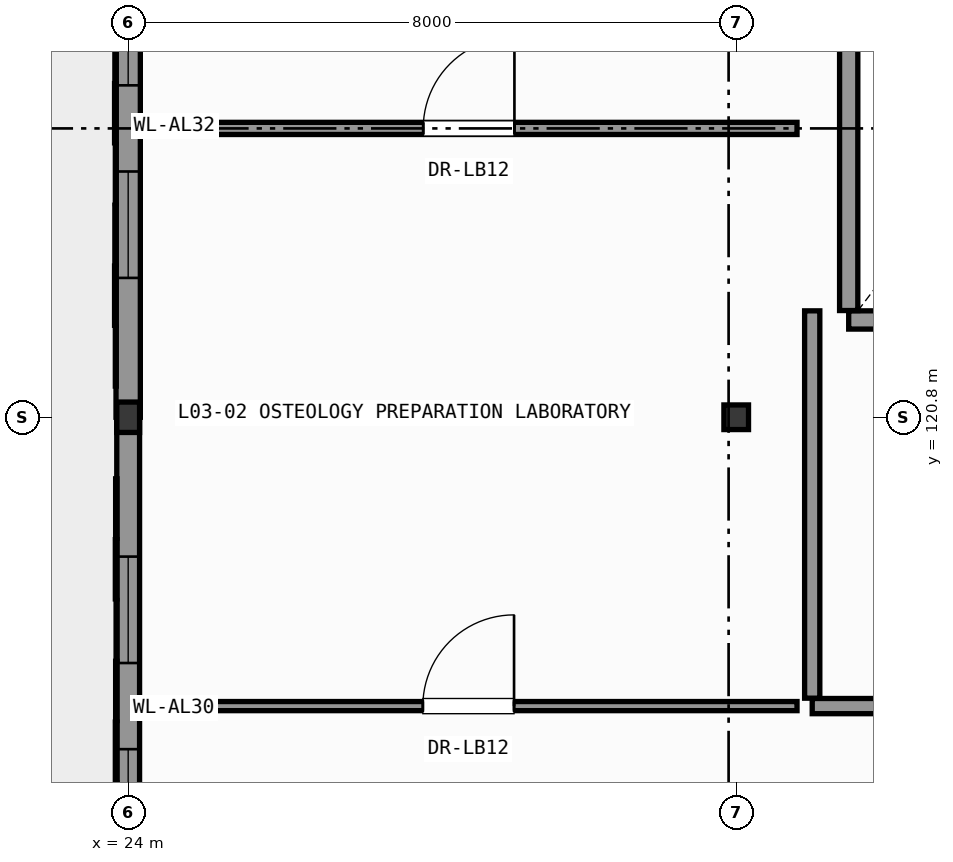
"""IFC4 building model, lengths in metres.
Left out: names, types, materials, properties, quantities, classifications, styles, units other than length and angle.
Written with IfcOpenShell. Run it as: python <this file> out.ifc"""

import sys

from ifc_helpers import new_model, si_unit, direction, frame, frame_2d, origin, origin_2d, place, context, subcontext, project, spatial, rectangle, hollow_circle, i_section, extrude, element, fill, save


model = new_model("IFC4")
c1 = context("Model", 3, precision=1e-05, world=origin(), true_north=direction((0.0, 1.0)))
c2 = subcontext(c1, "Body", "Model", "MODEL_VIEW")
j1 = project(units=[si_unit("LENGTHUNIT", "METRE"), si_unit("PLANEANGLEUNIT", "RADIAN")], contexts=[c1])
p1 = place(None, origin())
s1 = spatial("IfcSite", under=j1, at=p1, CompositionType="ELEMENT")
p2 = place(p1, origin())
s2 = spatial("IfcBuilding", under=s1, at=p2, CompositionType="ELEMENT")
p3 = place(p2, frame((0.0, 0.0, 13.2)))
s3 = spatial("IfcBuildingStorey", under=s2, at=p3, CompositionType="ELEMENT", Elevation=13.2)
p4 = place(p3, frame((24.0, 120.8, 0.0), z_axis=(0.0, 0.0, 1.0), x_axis=(1.0, 0.0, 0.0)))
e1 = element("IfcColumn", 1, at=p4, inside=s3, PredefinedType="COLUMN", context=c2, shape_type="SweptSolid", body=[
    extrude(i_section(OverallWidth=0.3, OverallDepth=0.4, WebThickness=0.013, FlangeThickness=0.024, FilletRadius=0.027, at=origin_2d()), origin(), (0.0, 0.0, 1.0), 4.8),
])
p5 = place(p3, frame((32.0, 120.8, 0.0), z_axis=(0.0, 0.0, 1.0), x_axis=(1.0, 0.0, 0.0)))
e2 = element("IfcColumn", 2, at=p5, inside=s3, PredefinedType="COLUMN", context=c2, shape_type="SweptSolid", body=[
    extrude(hollow_circle(Radius=0.162, WallThickness=0.016, at=origin_2d()), origin(), (0.0, 0.0, 1.0), 4.8),
])
p6 = place(p3, frame((24.0, 120.8, 0.0), z_axis=(0.0, 0.0, 1.0), x_axis=(0.0, 1.0, 0.0)))
e3 = element("IfcWall", 3, at=p6, inside=s3, PredefinedType="SOLIDWALL", context=c2, shape_type="SweptSolid", body=[
    extrude(rectangle(XDim=7.6, YDim=0.32, at=frame_2d((3.8, 0.0))), origin(), (0.0, 0.0, 1.0), 4.085),
])
p7 = place(p6, frame((1.833, 0.0, 0.95)))
e4 = element("IfcOpeningElement", 4, at=p7, cuts=e3, PredefinedType="OPENING", context=c2, shape_type="SweptSolid", body=[
    extrude(rectangle(XDim=1.4, YDim=2.0, at=frame_2d((0.7, 1.0))), frame((0.0, 0.17, 0.0), z_axis=(0.0, -1.0, 0.0), x_axis=(1.0, 0.0, 0.0)), (0.0, 0.0, 1.0), 0.34),
])
p8 = place(p6, frame((4.367, 0.0, 0.95)))
e5 = element("IfcOpeningElement", 5, at=p8, cuts=e3, PredefinedType="OPENING", context=c2, shape_type="SweptSolid", body=[
    extrude(rectangle(XDim=1.4, YDim=2.0, at=frame_2d((0.7, 1.0))), frame((0.0, 0.17, 0.0), z_axis=(0.0, -1.0, 0.0), x_axis=(1.0, 0.0, 0.0)), (0.0, 0.0, 1.0), 0.34),
])
p9 = place(p3, frame((24.0, 113.2, 0.0), z_axis=(0.0, 0.0, 1.0), x_axis=(0.0, 1.0, 0.0)))
e6 = element("IfcWall", 6, at=p9, inside=s3, PredefinedType="SOLIDWALL", context=c2, shape_type="SweptSolid", body=[
    extrude(rectangle(XDim=7.6, YDim=0.3, at=frame_2d((3.8, 0.0))), origin(), (0.0, 0.0, 1.0), 4.085),
])
p10 = place(p9, frame((1.833, 0.0, 0.95)))
e7 = element("IfcOpeningElement", 7, at=p10, cuts=e6, PredefinedType="OPENING", context=c2, shape_type="SweptSolid", body=[
    extrude(rectangle(XDim=1.4, YDim=2.0, at=frame_2d((0.7, 1.0))), frame((0.0, 0.16, 0.0), z_axis=(0.0, -1.0, 0.0), x_axis=(1.0, 0.0, 0.0)), (0.0, 0.0, 1.0), 0.32),
])
p11 = place(p9, frame((4.367, 0.0, 0.95)))
e8 = element("IfcOpeningElement", 8, at=p11, cuts=e6, PredefinedType="OPENING", context=c2, shape_type="SweptSolid", body=[
    extrude(rectangle(XDim=1.4, YDim=2.0, at=frame_2d((0.7, 1.0))), frame((0.0, 0.16, 0.0), z_axis=(0.0, -1.0, 0.0), x_axis=(1.0, 0.0, 0.0)), (0.0, 0.0, 1.0), 0.32),
])
p12 = place(p3, frame((33.48, 122.08, 0.0), z_axis=(0.0, 0.0, 1.0), x_axis=(1.0, 0.0, 0.0)))
e9 = element("IfcWall", 9, at=p12, inside=s3, PredefinedType="SHEAR", context=c2, shape_type="SweptSolid", body=[
    extrude(rectangle(XDim=4.04, YDim=0.24, at=frame_2d((2.02, 0.0))), origin(), (0.0, 0.0, 1.0), 4.56),
])
p13 = place(p12, frame((0.92, 0.0, 0.0)))
e10 = element("IfcOpeningElement", 10, at=p13, cuts=e9, PredefinedType="OPENING", context=c2, shape_type="SweptSolid", body=[
    extrude(rectangle(XDim=2.2, YDim=2.6, at=frame_2d((1.1, 1.3))), frame((0.0, 0.13, 0.0), z_axis=(0.0, -1.0, 0.0), x_axis=(1.0, 0.0, 0.0)), (0.0, 0.0, 1.0), 0.26),
])
p14 = place(p3, frame((33.48, 122.204, 0.0), z_axis=(0.0, 0.0, 1.0), x_axis=(0.0, 1.0, 0.0)))
e11 = element("IfcWall", 11, at=p14, inside=s3, PredefinedType="SHEAR", context=c2, shape_type="SweptSolid", body=[
    extrude(rectangle(XDim=4.992, YDim=0.24, at=frame_2d((2.496, 0.0))), origin(), (0.0, 0.0, 1.0), 4.56),
])
p15 = place(p3, frame((33.0, 117.0, 0.0), z_axis=(0.0, 0.0, 1.0), x_axis=(1.0, 0.0, 0.0)))
e12 = element("IfcWall", 12, at=p15, inside=s3, PredefinedType="PARTITIONING", context=c2, shape_type="SweptSolid", body=[
    extrude(rectangle(XDim=5.6, YDim=0.2, at=frame_2d((2.8, 0.0))), origin(), (0.0, 0.0, 1.0), 4.56),
])
p16 = place(p15, frame((2.05, 0.0, 0.0)))
e13 = element("IfcOpeningElement", 13, at=p16, cuts=e12, PredefinedType="OPENING", context=c2, shape_type="SweptSolid", body=[
    extrude(rectangle(XDim=1.5, YDim=2.2, at=frame_2d((0.75, 1.1))), frame((0.0, 0.11, 0.0), z_axis=(0.0, -1.0, 0.0), x_axis=(1.0, 0.0, 0.0)), (0.0, 0.0, 1.0), 0.22),
])
p17 = place(p3, frame((33.0, 117.104, 0.0), z_axis=(0.0, 0.0, 1.0), x_axis=(0.0, 1.0, 0.0)))
e14 = element("IfcWall", 14, at=p17, inside=s3, PredefinedType="PARTITIONING", context=c2, shape_type="SweptSolid", body=[
    extrude(rectangle(XDim=5.096, YDim=0.2, at=frame_2d((2.548, 0.0))), origin(), (0.0, 0.0, 1.0), 4.56),
])
p18 = place(p3, frame((24.164, 124.6, 0.0), z_axis=(0.0, 0.0, 1.0), x_axis=(1.0, 0.0, 0.0)))
e15 = element("IfcWall", 15, at=p18, inside=s3, PredefinedType="PARTITIONING", context=c2, shape_type="SweptSolid", body=[
    extrude(rectangle(XDim=8.636, YDim=0.16, at=frame_2d((4.318, 0.0))), origin(), (0.0, 0.0, 1.0), 4.56),
])
p19 = place(p18, frame((3.718, 0.0, 0.0)))
e16 = element("IfcOpeningElement", 16, at=p19, cuts=e15, PredefinedType="OPENING", context=c2, shape_type="SweptSolid", body=[
    extrude(rectangle(XDim=1.2, YDim=2.2, at=frame_2d((0.6, 1.1))), frame((0.0, 0.09, 0.0), z_axis=(0.0, -1.0, 0.0), x_axis=(1.0, 0.0, 0.0)), (0.0, 0.0, 1.0), 0.18),
])
p20 = place(p3, frame((24.154, 117.0, 0.0), z_axis=(0.0, 0.0, 1.0), x_axis=(1.0, 0.0, 0.0)))
e17 = element("IfcWall", 17, at=p20, inside=s3, PredefinedType="PARTITIONING", context=c2, shape_type="SweptSolid", body=[
    extrude(rectangle(XDim=8.646, YDim=0.12, at=frame_2d((4.323, 0.0))), origin(), (0.0, 0.0, 1.0), 4.56),
])
p21 = place(p20, frame((3.723, 0.0, 0.0)))
e18 = element("IfcOpeningElement", 18, at=p21, cuts=e17, PredefinedType="OPENING", context=c2, shape_type="SweptSolid", body=[
    extrude(rectangle(XDim=1.2, YDim=2.2, at=frame_2d((0.6, 1.1))), frame((0.0, 0.07, 0.0), z_axis=(0.0, -1.0, 0.0), x_axis=(1.0, 0.0, 0.0)), (0.0, 0.0, 1.0), 0.14),
])
p22 = place(p7, origin())
e19 = element("IfcWindow", 19, at=p22, inside=s3, PartitioningType="SINGLE_PANEL", PredefinedType="WINDOW", context=c2, shape_type="SweptSolid", body=[
    extrude(rectangle(XDim=1.4, YDim=2.0, at=frame_2d((0.7, 1.0))), frame((0.0, 0.03, 0.0), z_axis=(0.0, -1.0, 0.0), x_axis=(1.0, 0.0, 0.0)), (0.0, 0.0, 1.0), 0.06),
])
fill(e4, e19)
p23 = place(p8, origin())
e20 = element("IfcWindow", 20, at=p23, inside=s3, PartitioningType="SINGLE_PANEL", PredefinedType="WINDOW", context=c2, shape_type="SweptSolid", body=[
    extrude(rectangle(XDim=1.4, YDim=2.0, at=frame_2d((0.7, 1.0))), frame((0.0, 0.03, 0.0), z_axis=(0.0, -1.0, 0.0), x_axis=(1.0, 0.0, 0.0)), (0.0, 0.0, 1.0), 0.06),
])
fill(e5, e20)
p24 = place(p10, origin())
e21 = element("IfcWindow", 21, at=p24, inside=s3, PartitioningType="SINGLE_PANEL", PredefinedType="WINDOW", context=c2, shape_type="SweptSolid", body=[
    extrude(rectangle(XDim=1.4, YDim=2.0, at=frame_2d((0.7, 1.0))), frame((0.0, 0.03, 0.0), z_axis=(0.0, -1.0, 0.0), x_axis=(1.0, 0.0, 0.0)), (0.0, 0.0, 1.0), 0.06),
])
fill(e7, e21)
p25 = place(p11, origin())
e22 = element("IfcWindow", 22, at=p25, inside=s3, PartitioningType="SINGLE_PANEL", PredefinedType="WINDOW", context=c2, shape_type="SweptSolid", body=[
    extrude(rectangle(XDim=1.4, YDim=2.0, at=frame_2d((0.7, 1.0))), frame((0.0, 0.03, 0.0), z_axis=(0.0, -1.0, 0.0), x_axis=(1.0, 0.0, 0.0)), (0.0, 0.0, 1.0), 0.06),
])
fill(e8, e22)
p26 = place(p19, origin())
e23 = element("IfcDoor", 23, at=p26, inside=s3, OperationType="SINGLE_SWING_RIGHT", PredefinedType="DOOR", context=c2, shape_type="SweptSolid", body=[
    extrude(rectangle(XDim=1.2, YDim=2.2, at=frame_2d((0.6, 1.1))), frame((0.0, 0.025, 0.0), z_axis=(0.0, -1.0, 0.0), x_axis=(1.0, 0.0, 0.0)), (0.0, 0.0, 1.0), 0.05),
])
fill(e16, e23)
p27 = place(p21, origin())
e24 = element("IfcDoor", 24, at=p27, inside=s3, OperationType="SINGLE_SWING_RIGHT", PredefinedType="DOOR", context=c2, shape_type="SweptSolid", body=[
    extrude(rectangle(XDim=1.2, YDim=2.2, at=frame_2d((0.6, 1.1))), frame((0.0, 0.025, 0.0), z_axis=(0.0, -1.0, 0.0), x_axis=(1.0, 0.0, 0.0)), (0.0, 0.0, 1.0), 0.05),
])
fill(e18, e24)
save(model, sys.argv[1])
